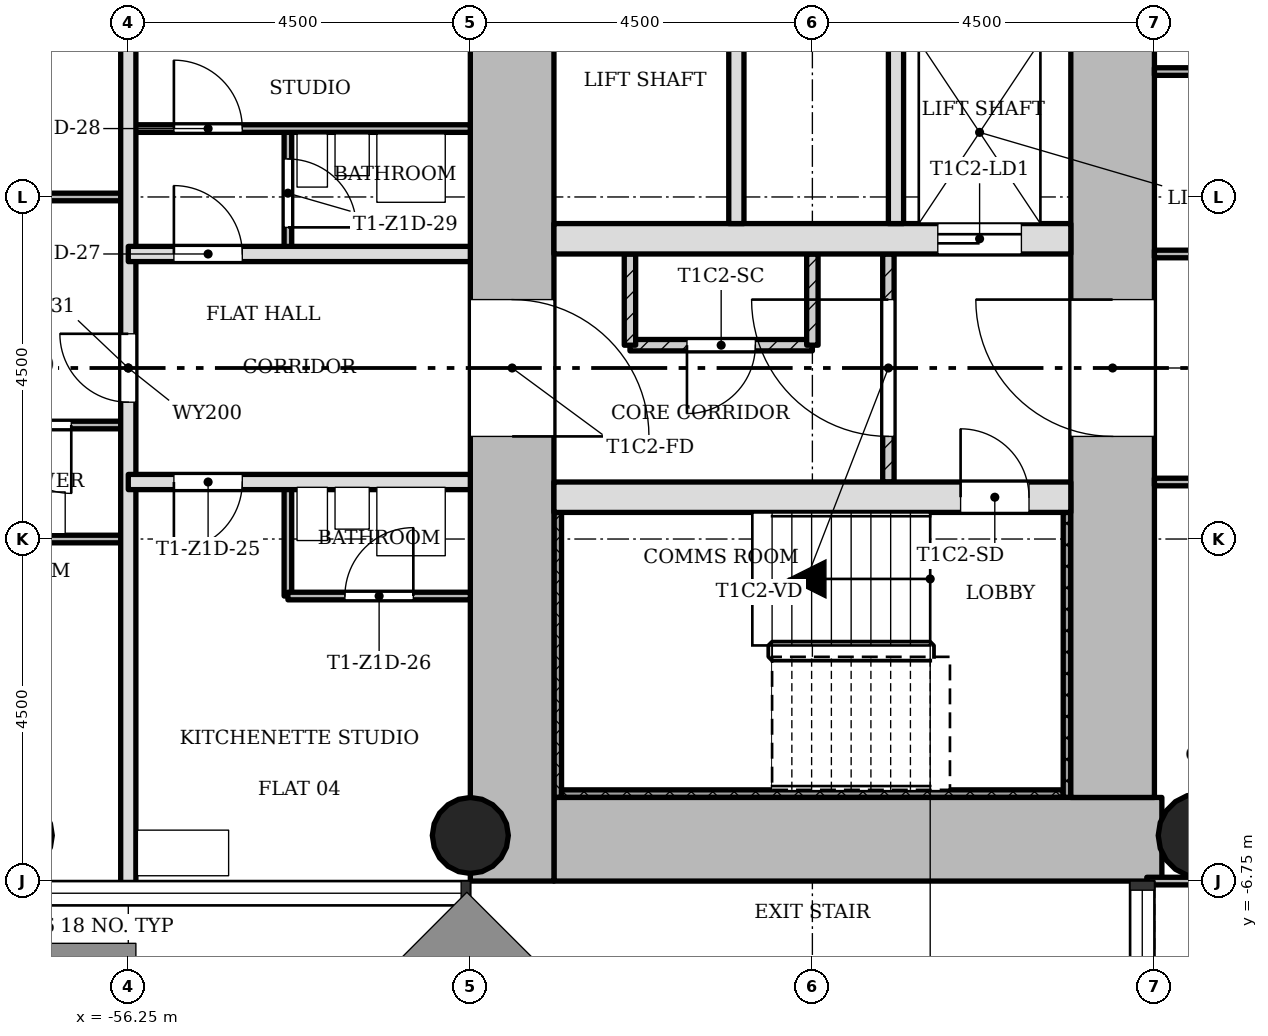
"""IFC4 building model, lengths in metres.
Left out: names, types, materials, properties, quantities, classifications, styles, units other than length and angle.
Written with IfcOpenShell. Run it as: python <this file> out.ifc"""

import sys

from ifc_helpers import new_model, si_unit, direction, frame, frame_2d, origin, origin_2d, place, context, subcontext, project, spatial, rectangle, hollow_circle, extrude, element, fill, save


model = new_model("IFC4")
c1 = context("Model", 3, precision=1e-05, world=origin(), true_north=direction((0.0, 1.0)))
c2 = subcontext(c1, "Body", "Model", "MODEL_VIEW")
j1 = project(units=[si_unit("LENGTHUNIT", "METRE"), si_unit("PLANEANGLEUNIT", "RADIAN")], contexts=[c1])
p1 = place(None, origin())
s1 = spatial("IfcSite", under=j1, at=p1, CompositionType="ELEMENT")
p2 = place(p1, origin())
s2 = spatial("IfcBuilding", under=s1, at=p2, CompositionType="ELEMENT")
p3 = place(p2, frame((0.0, 0.0, 58.5)))
s3 = spatial("IfcBuildingStorey", under=s2, at=p3, CompositionType="ELEMENT", Elevation=58.5)
p4 = place(p3, frame((-50.65, -6.2, 0.0), z_axis=(0.0, 0.0, 1.0), x_axis=(1.0, 0.0, 0.0)))
e1 = element("IfcWall", 1, at=p4, inside=s3, PredefinedType="SHEAR", context=c2, shape_type="SweptSolid", body=[
    extrude(rectangle(XDim=7.998, YDim=1.1, at=frame_2d((3.999, 0.0))), origin(), (0.0, 0.0, 1.0), 3.4),
])
p5 = place(p3, frame((-43.3, -5.65, 0.0), z_axis=(0.0, 0.0, 1.0), x_axis=(0.0, 1.0, 0.0)))
e2 = element("IfcWall", 2, at=p5, inside=s3, PredefinedType="SHEAR", context=c2, shape_type="SweptSolid", body=[
    extrude(rectangle(XDim=12.4, YDim=1.1, at=frame_2d((6.2, 0.0))), origin(), (0.0, 0.0, 1.0), 3.4),
])
p6 = place(p5, frame((4.75, 0.0, 0.0)))
e3 = element("IfcOpeningElement", 3, at=p6, cuts=e2, PredefinedType="OPENING", context=c2, shape_type="SweptSolid", body=[
    extrude(rectangle(XDim=1.8, YDim=2.1, at=frame_2d((0.9, 1.05))), frame((0.0, 0.56, 0.0), z_axis=(0.0, -1.0, 0.0), x_axis=(1.0, 0.0, 0.0)), (0.0, 0.0, 1.0), 1.12),
])
p7 = place(p3, frame((-51.2, 5.65, 0.0), z_axis=(0.0, 0.0, 1.0), x_axis=(0.0, -1.0, 0.0)))
e4 = element("IfcWall", 4, at=p7, inside=s3, PredefinedType="SHEAR", context=c2, shape_type="SweptSolid", body=[
    extrude(rectangle(XDim=12.4, YDim=1.1, at=frame_2d((6.2, 0.0))), origin(), (0.0, 0.0, 1.0), 3.4),
])
p8 = place(p7, frame((4.75, 0.0, 0.0)))
e5 = element("IfcOpeningElement", 5, at=p8, cuts=e4, PredefinedType="OPENING", context=c2, shape_type="SweptSolid", body=[
    extrude(rectangle(XDim=1.8, YDim=2.1, at=frame_2d((0.9, 1.05))), frame((0.0, 0.56, 0.0), z_axis=(0.0, -1.0, 0.0), x_axis=(1.0, 0.0, 0.0)), (0.0, 0.0, 1.0), 1.12),
])
p9 = place(p3, frame((-50.65, -1.7, 0.0), z_axis=(0.0, 0.0, 1.0), x_axis=(1.0, 0.0, 0.0)))
e6 = element("IfcWall", 6, at=p9, inside=s3, PredefinedType="SHEAR", context=c2, shape_type="SweptSolid", body=[
    extrude(rectangle(XDim=6.8, YDim=0.4, at=frame_2d((3.4, 0.0))), origin(), (0.0, 0.0, 1.0), 3.4),
])
p10 = place(p9, frame((5.35, 0.0, 0.0)))
e7 = element("IfcOpeningElement", 7, at=p10, cuts=e6, PredefinedType="OPENING", context=c2, shape_type="SweptSolid", body=[
    extrude(rectangle(XDim=0.9, YDim=2.1, at=frame_2d((0.45, 1.05))), frame((0.0, 0.21, 0.0), z_axis=(0.0, -1.0, 0.0), x_axis=(1.0, 0.0, 0.0)), (0.0, 0.0, 1.0), 0.42),
])
p11 = place(p3, frame((-50.65, 1.7, 0.0), z_axis=(0.0, 0.0, 1.0), x_axis=(1.0, 0.0, 0.0)))
e8 = element("IfcWall", 8, at=p11, inside=s3, PredefinedType="SHEAR", context=c2, shape_type="SweptSolid", body=[
    extrude(rectangle(XDim=6.8, YDim=0.4, at=frame_2d((3.4, 0.0))), origin(), (0.0, 0.0, 1.0), 3.4),
])
p12 = place(p11, frame((5.05, 0.0, 0.0)))
e9 = element("IfcOpeningElement", 9, at=p12, cuts=e8, PredefinedType="OPENING", context=c2, shape_type="SweptSolid", body=[
    extrude(rectangle(XDim=1.1, YDim=2.1, at=frame_2d((0.55, 1.05))), frame((0.0, 0.21, 0.0), z_axis=(0.0, -1.0, 0.0), x_axis=(1.0, 0.0, 0.0)), (0.0, 0.0, 1.0), 0.42),
])
p13 = place(p3, frame((-51.75, -6.15, 0.0), z_axis=(0.0, 0.0, 1.0), x_axis=(1.0, 0.0, 0.0)))
e10 = element("IfcColumn", 10, at=p13, inside=s3, PredefinedType="COLUMN", context=c2, shape_type="SweptSolid", body=[
    extrude(hollow_circle(Radius=0.5, WallThickness=0.036, at=origin_2d()), origin(), (0.0, 0.0, 1.0), 3.4),
])
p14 = place(p3, frame((-42.15, -6.15, 0.0), z_axis=(0.0, 0.0, 1.0), x_axis=(1.0, 0.0, 0.0)))
e11 = element("IfcColumn", 11, at=p14, inside=s3, PredefinedType="COLUMN", context=c2, shape_type="SweptSolid", body=[
    extrude(hollow_circle(Radius=0.55, WallThickness=0.04, at=origin_2d()), origin(), (0.0, 0.0, 1.0), 3.4),
])
p15 = place(p3, frame((-46.25, 1.5, 0.0), z_axis=(0.0, 0.0, 1.0), x_axis=(0.0, -1.0, 0.0)))
e12 = element("IfcWall", 12, at=p15, inside=s3, PredefinedType="PARTITIONING", context=c2, shape_type="SweptSolid", body=[
    extrude(rectangle(XDim=3.0, YDim=0.15, at=frame_2d((1.5, 0.0))), origin(), (0.0, 0.0, 1.0), 3.0),
])
p16 = place(p15, frame((0.6, 0.0, 0.0)))
e13 = element("IfcOpeningElement", 13, at=p16, cuts=e12, PredefinedType="OPENING", context=c2, shape_type="SweptSolid", body=[
    extrude(rectangle(XDim=1.8, YDim=2.1, at=frame_2d((0.9, 1.05))), frame((0.0, 0.085, 0.0), z_axis=(0.0, -1.0, 0.0), x_axis=(1.0, 0.0, 0.0)), (0.0, 0.0, 1.0), 0.17),
])
for number, where, z_axis, x_axis in (
    (14, (-46.15, 5.65, 0.0), (0.0, 0.0, 1.0), (0.0, -1.0, 0.0)),
    (15, (-48.25, 5.65, 0.0), (0.0, 0.0, 1.0), (0.0, -1.0, 0.0)),
):
    element("IfcWall", number, at=place(p3, frame(where, z_axis=z_axis, x_axis=x_axis)), inside=s3, PredefinedType="SOLIDWALL", context=c2, shape_type="SweptSolid", body=[
        extrude(rectangle(XDim=3.75, YDim=0.2, at=frame_2d((1.875, 0.0))), origin(), (0.0, 0.0, 1.0), 3.0),
    ])
p17 = place(p3, frame((-47.25, 0.3, 0.0), z_axis=(0.0, 0.0, 1.0), x_axis=(-1.0, 0.0, 0.0)))
e16 = element("IfcWall", 16, at=p17, inside=s3, PredefinedType="PARTITIONING", context=c2, shape_type="SweptSolid", body=[
    extrude(rectangle(XDim=2.4, YDim=0.15, at=frame_2d((1.2, 0.0))), origin(), (0.0, 0.0, 1.0), 3.0),
])
p18 = place(p17, frame((0.75, 0.0, 0.0)))
e17 = element("IfcOpeningElement", 17, at=p18, cuts=e16, PredefinedType="OPENING", context=c2, shape_type="SweptSolid", body=[
    extrude(rectangle(XDim=0.9, YDim=2.1, at=frame_2d((0.45, 1.05))), frame((0.0, 0.085, 0.0), z_axis=(0.0, -1.0, 0.0), x_axis=(1.0, 0.0, 0.0)), (0.0, 0.0, 1.0), 0.17),
])
for number, where, z_axis, x_axis in (
    (18, (-47.25, 0.3, 0.0), (0.0, 0.0, 1.0), (0.0, 1.0, 0.0)),
    (19, (-49.65, 0.3, 0.0), (0.0, 0.0, 1.0), (0.0, 1.0, 0.0)),
):
    element("IfcWall", number, at=place(p3, frame(where, z_axis=z_axis, x_axis=x_axis)), inside=s3, PredefinedType="PARTITIONING", context=c2, shape_type="SweptSolid", body=[
        extrude(rectangle(XDim=1.2, YDim=0.15, at=frame_2d((0.6, 0.0))), origin(), (0.0, 0.0, 1.0), 3.0),
    ])
p19 = place(p3, frame((-56.25, -6.85, 0.0), z_axis=(0.0, 0.0, 1.0), x_axis=(0.0, 1.0, 0.0)))
e20 = element("IfcWall", 20, at=p19, inside=s3, PredefinedType="SOLIDWALL", context=c2, shape_type="SweptSolid", body=[
    extrude(rectangle(XDim=13.7, YDim=0.2, at=frame_2d((6.85, 0.0))), origin(), (0.0, 0.0, 1.0), 3.0),
])
p20 = place(p19, frame((6.4, 0.0, 0.0)))
e21 = element("IfcOpeningElement", 21, at=p20, cuts=e20, PredefinedType="OPENING", context=c2, shape_type="SweptSolid", body=[
    extrude(rectangle(XDim=0.9, YDim=2.1, at=frame_2d((0.45, 1.05))), frame((0.0, 0.11, 0.0), z_axis=(0.0, -1.0, 0.0), x_axis=(1.0, 0.0, 0.0)), (0.0, 0.0, 1.0), 0.22),
])
p21 = place(p3, frame((-54.15, -3.0, 0.0), z_axis=(0.0, 0.0, 1.0), x_axis=(0.0, 1.0, 0.0)))
e22 = element("IfcWall", 22, at=p21, inside=s3, PredefinedType="PARTITIONING", context=c2, shape_type="SweptSolid", body=[
    extrude(rectangle(XDim=1.5, YDim=0.1, at=frame_2d((0.75, 0.0))), origin(), (0.0, 0.0, 1.0), 3.0),
])
p22 = place(p3, frame((-54.15, 1.5, 0.0), z_axis=(0.0, 0.0, 1.0), x_axis=(0.0, 1.0, 0.0)))
e23 = element("IfcWall", 23, at=p22, inside=s3, PredefinedType="PARTITIONING", context=c2, shape_type="SweptSolid", body=[
    extrude(rectangle(XDim=1.65, YDim=0.1, at=frame_2d((0.825, 0.0))), origin(), (0.0, 0.0, 1.0), 3.0),
])
p23 = place(p22, frame((0.35, 0.0, 0.0)))
e24 = element("IfcOpeningElement", 24, at=p23, cuts=e23, PredefinedType="OPENING", context=c2, shape_type="SweptSolid", body=[
    extrude(rectangle(XDim=0.9, YDim=2.1, at=frame_2d((0.45, 1.05))), frame((0.0, 0.06, 0.0), z_axis=(0.0, -1.0, 0.0), x_axis=(1.0, 0.0, 0.0)), (0.0, 0.0, 1.0), 0.12),
])
p24 = place(p3, frame((-42.85, -6.75, 0.0), z_axis=(0.0, 0.0, 1.0), x_axis=(1.0, 0.0, 0.0)))
e25 = element("IfcWall", 25, at=p24, inside=s3, PredefinedType="PARTITIONING", context=c2, shape_type="SweptSolid", body=[
    extrude(rectangle(XDim=5.95, YDim=0.1, at=frame_2d((2.975, 0.0))), origin(), (0.0, 0.0, 1.0), 3.0),
])
p25 = place(p3, frame((-54.15, -3.0, 0.0), z_axis=(0.0, 0.0, 1.0), x_axis=(1.0, 0.0, 0.0)))
e26 = element("IfcWall", 26, at=p25, inside=s3, PredefinedType="PARTITIONING", context=c2, shape_type="SweptSolid", body=[
    extrude(rectangle(XDim=2.4, YDim=0.1, at=frame_2d((1.2, 0.0))), origin(), (0.0, 0.0, 1.0), 3.0),
])
p26 = place(p25, frame((0.75, 0.0, 0.0)))
e27 = element("IfcOpeningElement", 27, at=p26, cuts=e26, PredefinedType="OPENING", context=c2, shape_type="SweptSolid", body=[
    extrude(rectangle(XDim=0.9, YDim=2.1, at=frame_2d((0.45, 1.05))), frame((0.0, 0.06, 0.0), z_axis=(0.0, -1.0, 0.0), x_axis=(1.0, 0.0, 0.0)), (0.0, 0.0, 1.0), 0.12),
])
p27 = place(p3, frame((-60.85, -2.25, 0.0), z_axis=(0.0, 0.0, 1.0), x_axis=(1.0, 0.0, 0.0)))
e28 = element("IfcWall", 28, at=p27, inside=s3, PredefinedType="PARTITIONING", context=c2, shape_type="SweptSolid", body=[
    extrude(rectangle(XDim=4.6, YDim=0.1, at=frame_2d((2.3, 0.0))), origin(), (0.0, 0.0, 1.0), 3.0),
])
p28 = place(p27, frame((1.25, 0.0, 0.0)))
e29 = element("IfcOpeningElement", 29, at=p28, cuts=e28, PredefinedType="OPENING", context=c2, shape_type="SweptSolid", body=[
    extrude(rectangle(XDim=0.9, YDim=2.1, at=frame_2d((0.45, 1.05))), frame((0.0, 0.06, 0.0), z_axis=(0.0, -1.0, 0.0), x_axis=(1.0, 0.0, 0.0)), (0.0, 0.0, 1.0), 0.12),
])
p29 = place(p3, frame((-42.75, -1.5, 0.0), z_axis=(0.0, 0.0, 1.0), x_axis=(1.0, 0.0, 0.0)))
e30 = element("IfcWall", 30, at=p29, inside=s3, PredefinedType="PARTITIONING", context=c2, shape_type="SweptSolid", body=[
    extrude(rectangle(XDim=5.85, YDim=0.1, at=frame_2d((2.925, 0.0))), origin(), (0.0, 0.0, 1.0), 3.0),
])
p30 = place(p29, frame((2.475, 0.0, 0.0)))
e31 = element("IfcOpeningElement", 31, at=p30, cuts=e30, PredefinedType="OPENING", context=c2, shape_type="SweptSolid", body=[
    extrude(rectangle(XDim=0.9, YDim=2.1, at=frame_2d((0.45, 1.05))), frame((0.0, 0.06, 0.0), z_axis=(0.0, -1.0, 0.0), x_axis=(1.0, 0.0, 0.0)), (0.0, 0.0, 1.0), 0.12),
])
p31 = place(p3, frame((-56.25, -1.5, 0.0), z_axis=(0.0, 0.0, 1.0), x_axis=(1.0, 0.0, 0.0)))
e32 = element("IfcWall", 32, at=p31, inside=s3, PredefinedType="SOLIDWALL", context=c2, shape_type="SweptSolid", body=[
    extrude(rectangle(XDim=4.5, YDim=0.2, at=frame_2d((2.25, 0.0))), origin(), (0.0, 0.0, 1.0), 3.0),
])
p32 = place(p31, frame((0.6, 0.0, 0.0)))
e33 = element("IfcOpeningElement", 33, at=p32, cuts=e32, PredefinedType="OPENING", context=c2, shape_type="SweptSolid", body=[
    extrude(rectangle(XDim=0.9, YDim=2.1, at=frame_2d((0.45, 1.05))), frame((0.0, 0.11, 0.0), z_axis=(0.0, -1.0, 0.0), x_axis=(1.0, 0.0, 0.0)), (0.0, 0.0, 1.0), 0.22),
])
p33 = place(p3, frame((-58.65, -0.75, 0.0), z_axis=(0.0, 0.0, 1.0), x_axis=(1.0, 0.0, 0.0)))
e34 = element("IfcWall", 34, at=p33, inside=s3, PredefinedType="PARTITIONING", context=c2, shape_type="SweptSolid", body=[
    extrude(rectangle(XDim=2.4, YDim=0.1, at=frame_2d((1.2, 0.0))), origin(), (0.0, 0.0, 1.0), 3.0),
])
p34 = place(p33, frame((0.75, 0.0, 0.0)))
e35 = element("IfcOpeningElement", 35, at=p34, cuts=e34, PredefinedType="OPENING", context=c2, shape_type="SweptSolid", body=[
    extrude(rectangle(XDim=0.9, YDim=2.1, at=frame_2d((0.45, 1.05))), frame((0.0, 0.06, 0.0), z_axis=(0.0, -1.0, 0.0), x_axis=(1.0, 0.0, 0.0)), (0.0, 0.0, 1.0), 0.12),
])
p35 = place(p3, frame((-42.75, 1.5, 0.0), z_axis=(0.0, 0.0, 1.0), x_axis=(1.0, 0.0, 0.0)))
e36 = element("IfcWall", 36, at=p35, inside=s3, PredefinedType="PARTITIONING", context=c2, shape_type="SweptSolid", body=[
    extrude(rectangle(XDim=5.85, YDim=0.1, at=frame_2d((2.925, 0.0))), origin(), (0.0, 0.0, 1.0), 3.0),
])
p36 = place(p35, frame((1.575, 0.0, 0.0)))
e37 = element("IfcOpeningElement", 37, at=p36, cuts=e36, PredefinedType="OPENING", context=c2, shape_type="SweptSolid", body=[
    extrude(rectangle(XDim=0.9, YDim=2.1, at=frame_2d((0.45, 1.05))), frame((0.0, 0.06, 0.0), z_axis=(0.0, -1.0, 0.0), x_axis=(1.0, 0.0, 0.0)), (0.0, 0.0, 1.0), 0.12),
])
p37 = place(p3, frame((-56.25, 1.5, 0.0), z_axis=(0.0, 0.0, 1.0), x_axis=(1.0, 0.0, 0.0)))
e38 = element("IfcWall", 38, at=p37, inside=s3, PredefinedType="SOLIDWALL", context=c2, shape_type="SweptSolid", body=[
    extrude(rectangle(XDim=4.5, YDim=0.2, at=frame_2d((2.25, 0.0))), origin(), (0.0, 0.0, 1.0), 3.0),
])
p38 = place(p37, frame((0.6, 0.0, 0.0)))
e39 = element("IfcOpeningElement", 39, at=p38, cuts=e38, PredefinedType="OPENING", context=c2, shape_type="SweptSolid", body=[
    extrude(rectangle(XDim=0.9, YDim=2.1, at=frame_2d((0.45, 1.05))), frame((0.0, 0.11, 0.0), z_axis=(0.0, -1.0, 0.0), x_axis=(1.0, 0.0, 0.0)), (0.0, 0.0, 1.0), 0.22),
])
p39 = place(p3, frame((-60.85, 2.25, 0.0), z_axis=(0.0, 0.0, 1.0), x_axis=(1.0, 0.0, 0.0)))
e40 = element("IfcWall", 40, at=p39, inside=s3, PredefinedType="PARTITIONING", context=c2, shape_type="SweptSolid", body=[
    extrude(rectangle(XDim=4.6, YDim=0.1, at=frame_2d((2.3, 0.0))), origin(), (0.0, 0.0, 1.0), 3.0),
])
p40 = place(p39, frame((1.9, 0.0, 0.0)))
e41 = element("IfcOpeningElement", 41, at=p40, cuts=e40, PredefinedType="OPENING", context=c2, shape_type="SweptSolid", body=[
    extrude(rectangle(XDim=0.9, YDim=2.1, at=frame_2d((0.45, 1.05))), frame((0.0, 0.06, 0.0), z_axis=(0.0, -1.0, 0.0), x_axis=(1.0, 0.0, 0.0)), (0.0, 0.0, 1.0), 0.12),
])
p41 = place(p3, frame((-56.25, 3.15, 0.0), z_axis=(0.0, 0.0, 1.0), x_axis=(1.0, 0.0, 0.0)))
e42 = element("IfcWall", 42, at=p41, inside=s3, PredefinedType="PARTITIONING", context=c2, shape_type="SweptSolid", body=[
    extrude(rectangle(XDim=4.5, YDim=0.1, at=frame_2d((2.25, 0.0))), origin(), (0.0, 0.0, 1.0), 3.0),
])
p42 = place(p41, frame((0.6, 0.0, 0.0)))
e43 = element("IfcOpeningElement", 43, at=p42, cuts=e42, PredefinedType="OPENING", context=c2, shape_type="SweptSolid", body=[
    extrude(rectangle(XDim=0.9, YDim=2.1, at=frame_2d((0.45, 1.05))), frame((0.0, 0.06, 0.0), z_axis=(0.0, -1.0, 0.0), x_axis=(1.0, 0.0, 0.0)), (0.0, 0.0, 1.0), 0.12),
])
p43 = place(p3, frame((-42.75, 3.9, 0.0), z_axis=(0.0, 0.0, 1.0), x_axis=(1.0, 0.0, 0.0)))
e44 = element("IfcWall", 44, at=p43, inside=s3, PredefinedType="PARTITIONING", context=c2, shape_type="SweptSolid", body=[
    extrude(rectangle(XDim=5.85, YDim=0.1, at=frame_2d((2.925, 0.0))), origin(), (0.0, 0.0, 1.0), 3.0),
])
p44 = place(p3, frame((-50.6, -1.9, 0.0), z_axis=(0.0, 0.0, 1.0), x_axis=(0.0, -1.0, 0.0)))
e45 = element("IfcWall", 45, at=p44, inside=s3, PredefinedType="SHEAR", context=c2, shape_type="SweptSolid", body=[
    extrude(rectangle(XDim=3.75, YDim=0.1, at=frame_2d((1.875, 0.0))), origin(), (0.0, 0.0, 1.0), 3.4),
])
p45 = place(p3, frame((-43.95, -5.6, 0.0), z_axis=(0.0, 0.0, 1.0), x_axis=(-1.0, 0.0, 0.0)))
e46 = element("IfcWall", 46, at=p45, inside=s3, PredefinedType="SHEAR", context=c2, shape_type="SweptSolid", body=[
    extrude(rectangle(XDim=6.6, YDim=0.1, at=frame_2d((3.3, 0.0))), origin(), (0.0, 0.0, 1.0), 3.4),
])
p46 = place(p3, frame((-43.9, -1.9, 0.0), z_axis=(0.0, 0.0, 1.0), x_axis=(0.0, -1.0, 0.0)))
e47 = element("IfcWall", 47, at=p46, inside=s3, PredefinedType="SHEAR", context=c2, shape_type="SweptSolid", body=[
    extrude(rectangle(XDim=3.75, YDim=0.1, at=frame_2d((1.875, 0.0))), origin(), (0.0, 0.0, 1.0), 3.4),
])
p47 = place(p16, origin())
e48 = element("IfcDoor", 48, at=p47, inside=s3, OperationType="SINGLE_SWING_LEFT", PredefinedType="DOOR", context=c2, shape_type="SweptSolid", body=[
    extrude(rectangle(XDim=1.8, YDim=2.1, at=frame_2d((0.9, 1.05))), frame((0.0, 0.025, 0.0), z_axis=(0.0, -1.0, 0.0), x_axis=(1.0, 0.0, 0.0)), (0.0, 0.0, 1.0), 0.05),
])
fill(e13, e48)
p48 = place(p18, origin())
e49 = element("IfcDoor", 49, at=p48, inside=s3, OperationType="SINGLE_SWING_LEFT", PredefinedType="DOOR", context=c2, shape_type="SweptSolid", body=[
    extrude(rectangle(XDim=0.9, YDim=2.1, at=frame_2d((0.45, 1.05))), frame((0.0, 0.025, 0.0), z_axis=(0.0, -1.0, 0.0), x_axis=(1.0, 0.0, 0.0)), (0.0, 0.0, 1.0), 0.05),
])
fill(e17, e49)
p49 = place(p32, origin())
e50 = element("IfcDoor", 50, at=p49, inside=s3, OperationType="SINGLE_SWING_LEFT", PredefinedType="DOOR", context=c2, shape_type="SweptSolid", body=[
    extrude(rectangle(XDim=0.9, YDim=2.1, at=frame_2d((0.45, 1.05))), frame((0.0, 0.025, 0.0), z_axis=(0.0, -1.0, 0.0), x_axis=(1.0, 0.0, 0.0)), (0.0, 0.0, 1.0), 0.05),
])
fill(e33, e50)
p50 = place(p26, origin())
e51 = element("IfcDoor", 51, at=p50, inside=s3, OperationType="SINGLE_SWING_LEFT", PredefinedType="DOOR", context=c2, shape_type="SweptSolid", body=[
    extrude(rectangle(XDim=0.9, YDim=2.1, at=frame_2d((0.45, 1.05))), frame((0.0, 0.025, 0.0), z_axis=(0.0, -1.0, 0.0), x_axis=(1.0, 0.0, 0.0)), (0.0, 0.0, 1.0), 0.05),
])
fill(e27, e51)
p51 = place(p38, origin())
e52 = element("IfcDoor", 52, at=p51, inside=s3, OperationType="SINGLE_SWING_RIGHT", PredefinedType="DOOR", context=c2, shape_type="SweptSolid", body=[
    extrude(rectangle(XDim=0.9, YDim=2.1, at=frame_2d((0.45, 1.05))), frame((0.0, 0.025, 0.0), z_axis=(0.0, -1.0, 0.0), x_axis=(1.0, 0.0, 0.0)), (0.0, 0.0, 1.0), 0.05),
])
fill(e39, e52)
p52 = place(p42, origin())
e53 = element("IfcDoor", 53, at=p52, inside=s3, OperationType="SINGLE_SWING_RIGHT", PredefinedType="DOOR", context=c2, shape_type="SweptSolid", body=[
    extrude(rectangle(XDim=0.9, YDim=2.1, at=frame_2d((0.45, 1.05))), frame((0.0, 0.025, 0.0), z_axis=(0.0, -1.0, 0.0), x_axis=(1.0, 0.0, 0.0)), (0.0, 0.0, 1.0), 0.05),
])
fill(e43, e53)
p53 = place(p23, origin())
e54 = element("IfcDoor", 54, at=p53, inside=s3, OperationType="SINGLE_SWING_LEFT", PredefinedType="DOOR", context=c2, shape_type="SweptSolid", body=[
    extrude(rectangle(XDim=0.9, YDim=2.1, at=frame_2d((0.45, 1.05))), frame((0.0, 0.025, 0.0), z_axis=(0.0, -1.0, 0.0), x_axis=(1.0, 0.0, 0.0)), (0.0, 0.0, 1.0), 0.05),
])
fill(e24, e54)
p54 = place(p34, origin())
e55 = element("IfcDoor", 55, at=p54, inside=s3, OperationType="SINGLE_SWING_RIGHT", PredefinedType="DOOR", context=c2, shape_type="SweptSolid", body=[
    extrude(rectangle(XDim=0.9, YDim=2.1, at=frame_2d((0.45, 1.05))), frame((0.0, 0.025, 0.0), z_axis=(0.0, -1.0, 0.0), x_axis=(1.0, 0.0, 0.0)), (0.0, 0.0, 1.0), 0.05),
])
fill(e35, e55)
p55 = place(p20, origin())
e56 = element("IfcDoor", 56, at=p55, inside=s3, OperationType="SINGLE_SWING_LEFT", PredefinedType="DOOR", context=c2, shape_type="SweptSolid", body=[
    extrude(rectangle(XDim=0.9, YDim=2.1, at=frame_2d((0.45, 1.05))), frame((0.0, 0.025, 0.0), z_axis=(0.0, -1.0, 0.0), x_axis=(1.0, 0.0, 0.0)), (0.0, 0.0, 1.0), 0.05),
])
fill(e21, e56)
p56 = place(p10, origin())
e57 = element("IfcDoor", 57, at=p56, inside=s3, OperationType="SINGLE_SWING_RIGHT", PredefinedType="DOOR", context=c2, shape_type="SweptSolid", body=[
    extrude(rectangle(XDim=0.9, YDim=2.1, at=frame_2d((0.45, 1.05))), frame((0.0, 0.025, 0.0), z_axis=(0.0, -1.0, 0.0), x_axis=(1.0, 0.0, 0.0)), (0.0, 0.0, 1.0), 0.05),
])
fill(e7, e57)
p57 = place(p12, origin())
e58 = element("IfcDoor", 58, at=p57, inside=s3, OperationType="SLIDING_TO_LEFT", PredefinedType="DOOR", context=c2, shape_type="SweptSolid", body=[
    extrude(rectangle(XDim=1.1, YDim=2.1, at=frame_2d((0.55, 1.05))), frame((0.0, 0.025, 0.0), z_axis=(0.0, -1.0, 0.0), x_axis=(1.0, 0.0, 0.0)), (0.0, 0.0, 1.0), 0.05),
])
fill(e9, e58)
p58 = place(p6, origin())
e59 = element("IfcDoor", 59, at=p58, inside=s3, OperationType="SINGLE_SWING_LEFT", PredefinedType="DOOR", context=c2, shape_type="SweptSolid", body=[
    extrude(rectangle(XDim=1.8, YDim=2.1, at=frame_2d((0.9, 1.05))), frame((0.0, 0.025, 0.0), z_axis=(0.0, -1.0, 0.0), x_axis=(1.0, 0.0, 0.0)), (0.0, 0.0, 1.0), 0.05),
])
fill(e3, e59)
p59 = place(p8, origin())
e60 = element("IfcDoor", 60, at=p59, inside=s3, OperationType="SINGLE_SWING_LEFT", PredefinedType="DOOR", context=c2, shape_type="SweptSolid", body=[
    extrude(rectangle(XDim=1.8, YDim=2.1, at=frame_2d((0.9, 1.05))), frame((0.0, 0.025, 0.0), z_axis=(0.0, -1.0, 0.0), x_axis=(1.0, 0.0, 0.0)), (0.0, 0.0, 1.0), 0.05),
])
fill(e5, e60)
save(model, sys.argv[1])
